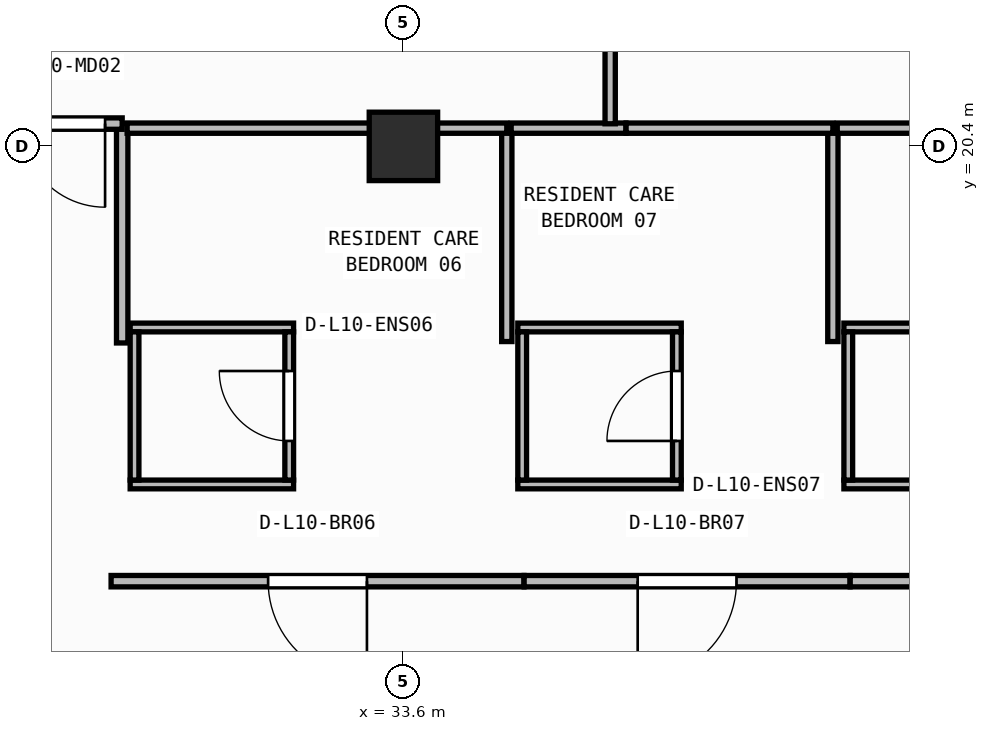
"""IFC4 building model, lengths in metres.
Left out: names, types, materials, properties, quantities, classifications, styles, units other than length and angle.
Written with IfcOpenShell. Run it as: python <this file> out.ifc"""

import sys

from ifc_helpers import new_model, si_unit, direction, frame, frame_2d, origin, origin_2d, place, context, subcontext, project, spatial, rectangle, extrude, element, fill, save


model = new_model("IFC4")
c1 = context("Model", 3, precision=1e-05, world=origin(), true_north=direction((0.0, 1.0)))
c2 = subcontext(c1, "Body", "Model", "MODEL_VIEW")
j1 = project(units=[si_unit("LENGTHUNIT", "METRE"), si_unit("PLANEANGLEUNIT", "RADIAN")], contexts=[c1])
p1 = place(None, origin())
s1 = spatial("IfcSite", under=j1, at=p1, CompositionType="ELEMENT")
p2 = place(p1, origin())
s2 = spatial("IfcBuilding", under=s1, at=p2, CompositionType="ELEMENT")
p3 = place(p2, frame((0.0, 0.0, 42.25)))
s3 = spatial("IfcBuildingStorey", under=s2, at=p3, CompositionType="ELEMENT", Elevation=42.25)
p4 = place(p3, frame((33.6, 20.4, 0.0), z_axis=(0.0, 0.0, 1.0), x_axis=(1.0, 0.0, 0.0)))
e1 = element("IfcColumn", 1, at=p4, inside=s3, PredefinedType="COLUMN", context=c2, shape_type="SweptSolid", body=[
    extrude(rectangle(XDim=0.9, YDim=0.9, at=origin_2d()), origin(), (0.0, 0.0, 1.0), 3.95),
])
p5 = place(p3, frame((30.005, 15.952, 0.0), z_axis=(0.0, 0.0, 1.0), x_axis=(1.0, 0.0, 0.0)))
e2 = element("IfcWall", 2, at=p5, inside=s3, PredefinedType="PARTITIONING", context=c2, shape_type="SweptSolid", body=[
    extrude(rectangle(XDim=2.15, YDim=0.115, at=frame_2d((1.075, 0.0))), origin(), (0.0, 0.0, 1.0), 3.381),
])
p6 = place(p3, frame((30.005, 18.018, 0.0), z_axis=(0.0, 0.0, 1.0), x_axis=(1.0, 0.0, 0.0)))
e3 = element("IfcWall", 3, at=p6, inside=s3, PredefinedType="PARTITIONING", context=c2, shape_type="SweptSolid", body=[
    extrude(rectangle(XDim=2.15, YDim=0.115, at=frame_2d((1.075, 0.0))), origin(), (0.0, 0.0, 1.0), 3.71),
])
p7 = place(p3, frame((30.062, 16.01, 0.0), z_axis=(0.0, 0.0, 1.0), x_axis=(0.0, 1.0, 0.0)))
e4 = element("IfcWall", 4, at=p7, inside=s3, PredefinedType="PARTITIONING", context=c2, shape_type="SweptSolid", body=[
    extrude(rectangle(XDim=1.95, YDim=0.115, at=frame_2d((0.975, 0.0))), origin(), (0.0, 0.0, 1.0), 3.71),
])
p8 = place(p3, frame((32.097, 16.01, 0.0), z_axis=(0.0, 0.0, 1.0), x_axis=(0.0, 1.0, 0.0)))
e5 = element("IfcWall", 5, at=p8, inside=s3, PredefinedType="PARTITIONING", context=c2, shape_type="SweptSolid", body=[
    extrude(rectangle(XDim=1.95, YDim=0.115, at=frame_2d((0.975, 0.0))), origin(), (0.0, 0.0, 1.0), 3.71),
])
p9 = place(p8, frame((0.515, 0.0, 0.0)))
e6 = element("IfcOpeningElement", 6, at=p9, cuts=e5, PredefinedType="OPENING", context=c2, shape_type="SweptSolid", body=[
    extrude(rectangle(XDim=0.92, YDim=2.1, at=frame_2d((0.46, 1.05))), frame((0.0, 0.067, 0.0), z_axis=(0.0, -1.0, 0.0), x_axis=(1.0, 0.0, 0.0)), (0.0, 0.0, 1.0), 0.135),
])
p10 = place(p3, frame((35.105, 15.952, 0.0), z_axis=(0.0, 0.0, 1.0), x_axis=(1.0, 0.0, 0.0)))
e7 = element("IfcWall", 7, at=p10, inside=s3, PredefinedType="PARTITIONING", context=c2, shape_type="SweptSolid", body=[
    extrude(rectangle(XDim=2.15, YDim=0.115, at=frame_2d((1.075, 0.0))), origin(), (0.0, 0.0, 1.0), 3.381),
])
p11 = place(p3, frame((35.105, 18.018, 0.0), z_axis=(0.0, 0.0, 1.0), x_axis=(1.0, 0.0, 0.0)))
e8 = element("IfcWall", 8, at=p11, inside=s3, PredefinedType="PARTITIONING", context=c2, shape_type="SweptSolid", body=[
    extrude(rectangle(XDim=2.15, YDim=0.115, at=frame_2d((1.075, 0.0))), origin(), (0.0, 0.0, 1.0), 3.71),
])
p12 = place(p3, frame((35.163, 16.01, 0.0), z_axis=(0.0, 0.0, 1.0), x_axis=(0.0, 1.0, 0.0)))
e9 = element("IfcWall", 9, at=p12, inside=s3, PredefinedType="PARTITIONING", context=c2, shape_type="SweptSolid", body=[
    extrude(rectangle(XDim=1.95, YDim=0.115, at=frame_2d((0.975, 0.0))), origin(), (0.0, 0.0, 1.0), 3.71),
])
p13 = place(p3, frame((37.198, 16.01, 0.0), z_axis=(0.0, 0.0, 1.0), x_axis=(0.0, 1.0, 0.0)))
e10 = element("IfcWall", 10, at=p13, inside=s3, PredefinedType="PARTITIONING", context=c2, shape_type="SweptSolid", body=[
    extrude(rectangle(XDim=1.95, YDim=0.115, at=frame_2d((0.975, 0.0))), origin(), (0.0, 0.0, 1.0), 3.71),
])
p14 = place(p13, frame((0.515, 0.0, 0.0)))
e11 = element("IfcOpeningElement", 11, at=p14, cuts=e10, PredefinedType="OPENING", context=c2, shape_type="SweptSolid", body=[
    extrude(rectangle(XDim=0.92, YDim=2.1, at=frame_2d((0.46, 1.05))), frame((0.0, 0.067, 0.0), z_axis=(0.0, -1.0, 0.0), x_axis=(1.0, 0.0, 0.0)), (0.0, 0.0, 1.0), 0.135),
])
p15 = place(p3, frame((39.395, 15.952, 0.0), z_axis=(0.0, 0.0, 1.0), x_axis=(1.0, 0.0, 0.0)))
e12 = element("IfcWall", 12, at=p15, inside=s3, PredefinedType="PARTITIONING", context=c2, shape_type="SweptSolid", body=[
    extrude(rectangle(XDim=2.15, YDim=0.115, at=frame_2d((1.075, 0.0))), origin(), (0.0, 0.0, 1.0), 3.381),
])
p16 = place(p3, frame((39.395, 18.018, 0.0), z_axis=(0.0, 0.0, 1.0), x_axis=(1.0, 0.0, 0.0)))
e13 = element("IfcWall", 13, at=p16, inside=s3, PredefinedType="PARTITIONING", context=c2, shape_type="SweptSolid", body=[
    extrude(rectangle(XDim=2.15, YDim=0.115, at=frame_2d((1.075, 0.0))), origin(), (0.0, 0.0, 1.0), 3.71),
])
p17 = place(p3, frame((39.452, 16.01, 0.0), z_axis=(0.0, 0.0, 1.0), x_axis=(0.0, 1.0, 0.0)))
e14 = element("IfcWall", 14, at=p17, inside=s3, PredefinedType="PARTITIONING", context=c2, shape_type="SweptSolid", body=[
    extrude(rectangle(XDim=1.95, YDim=0.115, at=frame_2d((0.975, 0.0))), origin(), (0.0, 0.0, 1.0), 3.71),
])
p18 = place(p3, frame((35.186, 14.68, 0.0), z_axis=(0.0, 0.0, 1.0), x_axis=(-1.0, 0.0, 0.0)))
e15 = element("IfcWall", 15, at=p18, inside=s3, PredefinedType="PARTITIONING", context=c2, shape_type="SweptSolid", body=[
    extrude(rectangle(XDim=5.432, YDim=0.15, at=frame_2d((2.716, 0.0))), origin(), (0.0, 0.0, 1.0), 3.71),
])
p19 = place(p18, frame((2.066, 0.0, 0.0)))
e16 = element("IfcOpeningElement", 16, at=p19, cuts=e15, PredefinedType="OPENING", context=c2, shape_type="SweptSolid", body=[
    extrude(rectangle(XDim=1.3, YDim=2.15, at=frame_2d((0.65, 1.075))), frame((0.0, 0.085, 0.0), z_axis=(0.0, -1.0, 0.0), x_axis=(1.0, 0.0, 0.0)), (0.0, 0.0, 1.0), 0.17),
])
p20 = place(p3, frame((39.476, 14.68, 0.0), z_axis=(0.0, 0.0, 1.0), x_axis=(-1.0, 0.0, 0.0)))
e17 = element("IfcWall", 17, at=p20, inside=s3, PredefinedType="PARTITIONING", context=c2, shape_type="SweptSolid", body=[
    extrude(rectangle(XDim=4.288, YDim=0.15, at=frame_2d((2.144, 0.0))), origin(), (0.0, 0.0, 1.0), 3.71),
])
p21 = place(p20, frame((1.494, 0.0, 0.0)))
e18 = element("IfcOpeningElement", 18, at=p21, cuts=e17, PredefinedType="OPENING", context=c2, shape_type="SweptSolid", body=[
    extrude(rectangle(XDim=1.3, YDim=2.15, at=frame_2d((0.65, 1.075))), frame((0.0, 0.085, 0.0), z_axis=(0.0, -1.0, 0.0), x_axis=(1.0, 0.0, 0.0)), (0.0, 0.0, 1.0), 0.17),
])
p22 = place(p3, frame((44.136, 14.68, 0.0), z_axis=(0.0, 0.0, 1.0), x_axis=(-1.0, 0.0, 0.0)))
e19 = element("IfcWall", 19, at=p22, inside=s3, PredefinedType="PARTITIONING", context=c2, shape_type="SweptSolid", body=[
    extrude(rectangle(XDim=4.658, YDim=0.15, at=frame_2d((2.329, 0.0))), origin(), (0.0, 0.0, 1.0), 3.71),
])
p23 = place(p22, frame((1.679, 0.0, 0.0)))
e20 = element("IfcOpeningElement", 20, at=p23, cuts=e19, PredefinedType="OPENING", context=c2, shape_type="SweptSolid", body=[
    extrude(rectangle(XDim=1.3, YDim=2.15, at=frame_2d((0.65, 1.075))), frame((0.0, 0.085, 0.0), z_axis=(0.0, -1.0, 0.0), x_axis=(1.0, 0.0, 0.0)), (0.0, 0.0, 1.0), 0.17),
])
p24 = place(p3, frame((29.9, 17.814, 0.0), z_axis=(0.0, 0.0, 1.0), x_axis=(0.0, 1.0, 0.0)))
e21 = element("IfcWall", 21, at=p24, inside=s3, PredefinedType="PARTITIONING", context=c2, shape_type="SweptSolid", body=[
    extrude(rectangle(XDim=2.886, YDim=0.15, at=frame_2d((1.443, 0.0))), origin(), (0.0, 0.0, 1.0), 3.71),
])
p25 = place(p3, frame((29.9, 20.7, 0.0), z_axis=(0.0, 0.0, 1.0), x_axis=(-1.0, 0.0, 0.0)))
e22 = element("IfcWall", 22, at=p25, inside=s3, PredefinedType="PARTITIONING", context=c2, shape_type="SweptSolid", body=[
    extrude(rectangle(XDim=2.5, YDim=0.15, at=frame_2d((1.25, 0.0))), origin(), (0.0, 0.0, 1.0), 3.073),
])
p26 = place(p25, frame((0.225, 0.0, 0.0)))
e23 = element("IfcOpeningElement", 23, at=p26, cuts=e22, PredefinedType="OPENING", context=c2, shape_type="SweptSolid", body=[
    extrude(rectangle(XDim=1.1, YDim=2.1, at=frame_2d((0.55, 1.05))), frame((0.0, 0.085, 0.0), z_axis=(0.0, -1.0, 0.0), x_axis=(1.0, 0.0, 0.0)), (0.0, 0.0, 1.0), 0.17),
])
p27 = place(p3, frame((34.96, 17.833, 0.0), z_axis=(0.0, 0.0, 1.0), x_axis=(0.0, 1.0, 0.0)))
e24 = element("IfcWall", 24, at=p27, inside=s3, PredefinedType="PARTITIONING", context=c2, shape_type="SweptSolid", body=[
    extrude(rectangle(XDim=2.807, YDim=0.135, at=frame_2d((1.404, 0.0))), origin(), (0.0, 0.0, 1.0), 3.71),
])
p28 = place(p3, frame((34.96, 20.64, 0.0), z_axis=(0.0, 0.0, 1.0), x_axis=(-1.0, 0.0, 0.0)))
e25 = element("IfcWall", 25, at=p28, inside=s3, PredefinedType="PARTITIONING", context=c2, shape_type="SweptSolid", body=[
    extrude(rectangle(XDim=4.995, YDim=0.135, at=frame_2d((2.498, 0.0))), origin(), (0.0, 0.0, 1.0), 3.073),
])
p29 = place(p3, frame((39.25, 17.833, 0.0), z_axis=(0.0, 0.0, 1.0), x_axis=(0.0, 1.0, 0.0)))
e26 = element("IfcWall", 26, at=p29, inside=s3, PredefinedType="PARTITIONING", context=c2, shape_type="SweptSolid", body=[
    extrude(rectangle(XDim=2.807, YDim=0.135, at=frame_2d((1.404, 0.0))), origin(), (0.0, 0.0, 1.0), 3.71),
])
p30 = place(p3, frame((36.528, 20.64, 0.0), z_axis=(0.0, 0.0, 1.0), x_axis=(-1.0, 0.0, 0.0)))
e27 = element("IfcWall", 27, at=p30, inside=s3, PredefinedType="PARTITIONING", context=c2, shape_type="SweptSolid", body=[
    extrude(rectangle(XDim=1.51, YDim=0.135, at=frame_2d((0.755, 0.0))), origin(), (0.0, 0.0, 1.0), 3.073),
])
p31 = place(p3, frame((39.25, 20.64, 0.0), z_axis=(0.0, 0.0, 1.0), x_axis=(-1.0, 0.0, 0.0)))
e28 = element("IfcWall", 28, at=p31, inside=s3, PredefinedType="PARTITIONING", context=c2, shape_type="SweptSolid", body=[
    extrude(rectangle(XDim=2.72, YDim=0.135, at=frame_2d((1.36, 0.0))), origin(), (0.0, 0.0, 1.0), 3.073),
])
p32 = place(p3, frame((43.91, 20.64, 0.0), z_axis=(0.0, 0.0, 1.0), x_axis=(-1.0, 0.0, 0.0)))
e29 = element("IfcWall", 29, at=p32, inside=s3, PredefinedType="PARTITIONING", context=c2, shape_type="SweptSolid", body=[
    extrude(rectangle(XDim=4.602, YDim=0.135, at=frame_2d((2.301, 0.0))), origin(), (0.0, 0.0, 1.0), 3.073),
])
p33 = place(p3, frame((36.32, 20.698, 0.0), z_axis=(0.0, 0.0, 1.0), x_axis=(0.0, 1.0, 0.0)))
e30 = element("IfcWall", 30, at=p33, inside=s3, PredefinedType="PARTITIONING", context=c2, shape_type="SweptSolid", body=[
    extrude(rectangle(XDim=10.678, YDim=0.135, at=frame_2d((5.339, 0.0))), origin(), (0.0, 0.0, 1.0), 3.71),
])
p34 = place(p33, frame((4.789, 0.0, 0.0)))
e31 = element("IfcOpeningElement", 31, at=p34, cuts=e30, PredefinedType="OPENING", context=c2, shape_type="SweptSolid", body=[
    extrude(rectangle(XDim=1.1, YDim=2.1, at=frame_2d((0.55, 1.05))), frame((0.0, 0.077, 0.0), z_axis=(0.0, -1.0, 0.0), x_axis=(1.0, 0.0, 0.0)), (0.0, 0.0, 1.0), 0.155),
])
p35 = place(p9, origin())
e32 = element("IfcDoor", 32, at=p35, inside=s3, OperationType="SINGLE_SWING_RIGHT", PredefinedType="DOOR", context=c2, shape_type="SweptSolid", body=[
    extrude(rectangle(XDim=0.92, YDim=2.1, at=frame_2d((0.46, 1.05))), frame((0.0, 0.025, 0.0), z_axis=(0.0, -1.0, 0.0), x_axis=(1.0, 0.0, 0.0)), (0.0, 0.0, 1.0), 0.05),
])
fill(e6, e32)
p36 = place(p14, origin())
e33 = element("IfcDoor", 33, at=p36, inside=s3, OperationType="SINGLE_SWING_LEFT", PredefinedType="DOOR", context=c2, shape_type="SweptSolid", body=[
    extrude(rectangle(XDim=0.92, YDim=2.1, at=frame_2d((0.46, 1.05))), frame((0.0, 0.025, 0.0), z_axis=(0.0, -1.0, 0.0), x_axis=(1.0, 0.0, 0.0)), (0.0, 0.0, 1.0), 0.05),
])
fill(e11, e33)
p37 = place(p19, origin())
e34 = element("IfcDoor", 34, at=p37, inside=s3, OperationType="SINGLE_SWING_LEFT", PredefinedType="DOOR", context=c2, shape_type="SweptSolid", body=[
    extrude(rectangle(XDim=1.3, YDim=2.15, at=frame_2d((0.65, 1.075))), frame((0.0, 0.025, 0.0), z_axis=(0.0, -1.0, 0.0), x_axis=(1.0, 0.0, 0.0)), (0.0, 0.0, 1.0), 0.05),
])
fill(e16, e34)
p38 = place(p21, origin())
e35 = element("IfcDoor", 35, at=p38, inside=s3, OperationType="SINGLE_SWING_RIGHT", PredefinedType="DOOR", context=c2, shape_type="SweptSolid", body=[
    extrude(rectangle(XDim=1.3, YDim=2.15, at=frame_2d((0.65, 1.075))), frame((0.0, 0.025, 0.0), z_axis=(0.0, -1.0, 0.0), x_axis=(1.0, 0.0, 0.0)), (0.0, 0.0, 1.0), 0.05),
])
fill(e18, e35)
p39 = place(p26, origin())
e36 = element("IfcDoor", 36, at=p39, inside=s3, OperationType="SINGLE_SWING_LEFT", PredefinedType="DOOR", context=c2, shape_type="SweptSolid", body=[
    extrude(rectangle(XDim=1.1, YDim=2.1, at=frame_2d((0.55, 1.05))), frame((0.0, 0.025, 0.0), z_axis=(0.0, -1.0, 0.0), x_axis=(1.0, 0.0, 0.0)), (0.0, 0.0, 1.0), 0.05),
])
fill(e23, e36)
save(model, sys.argv[1])
